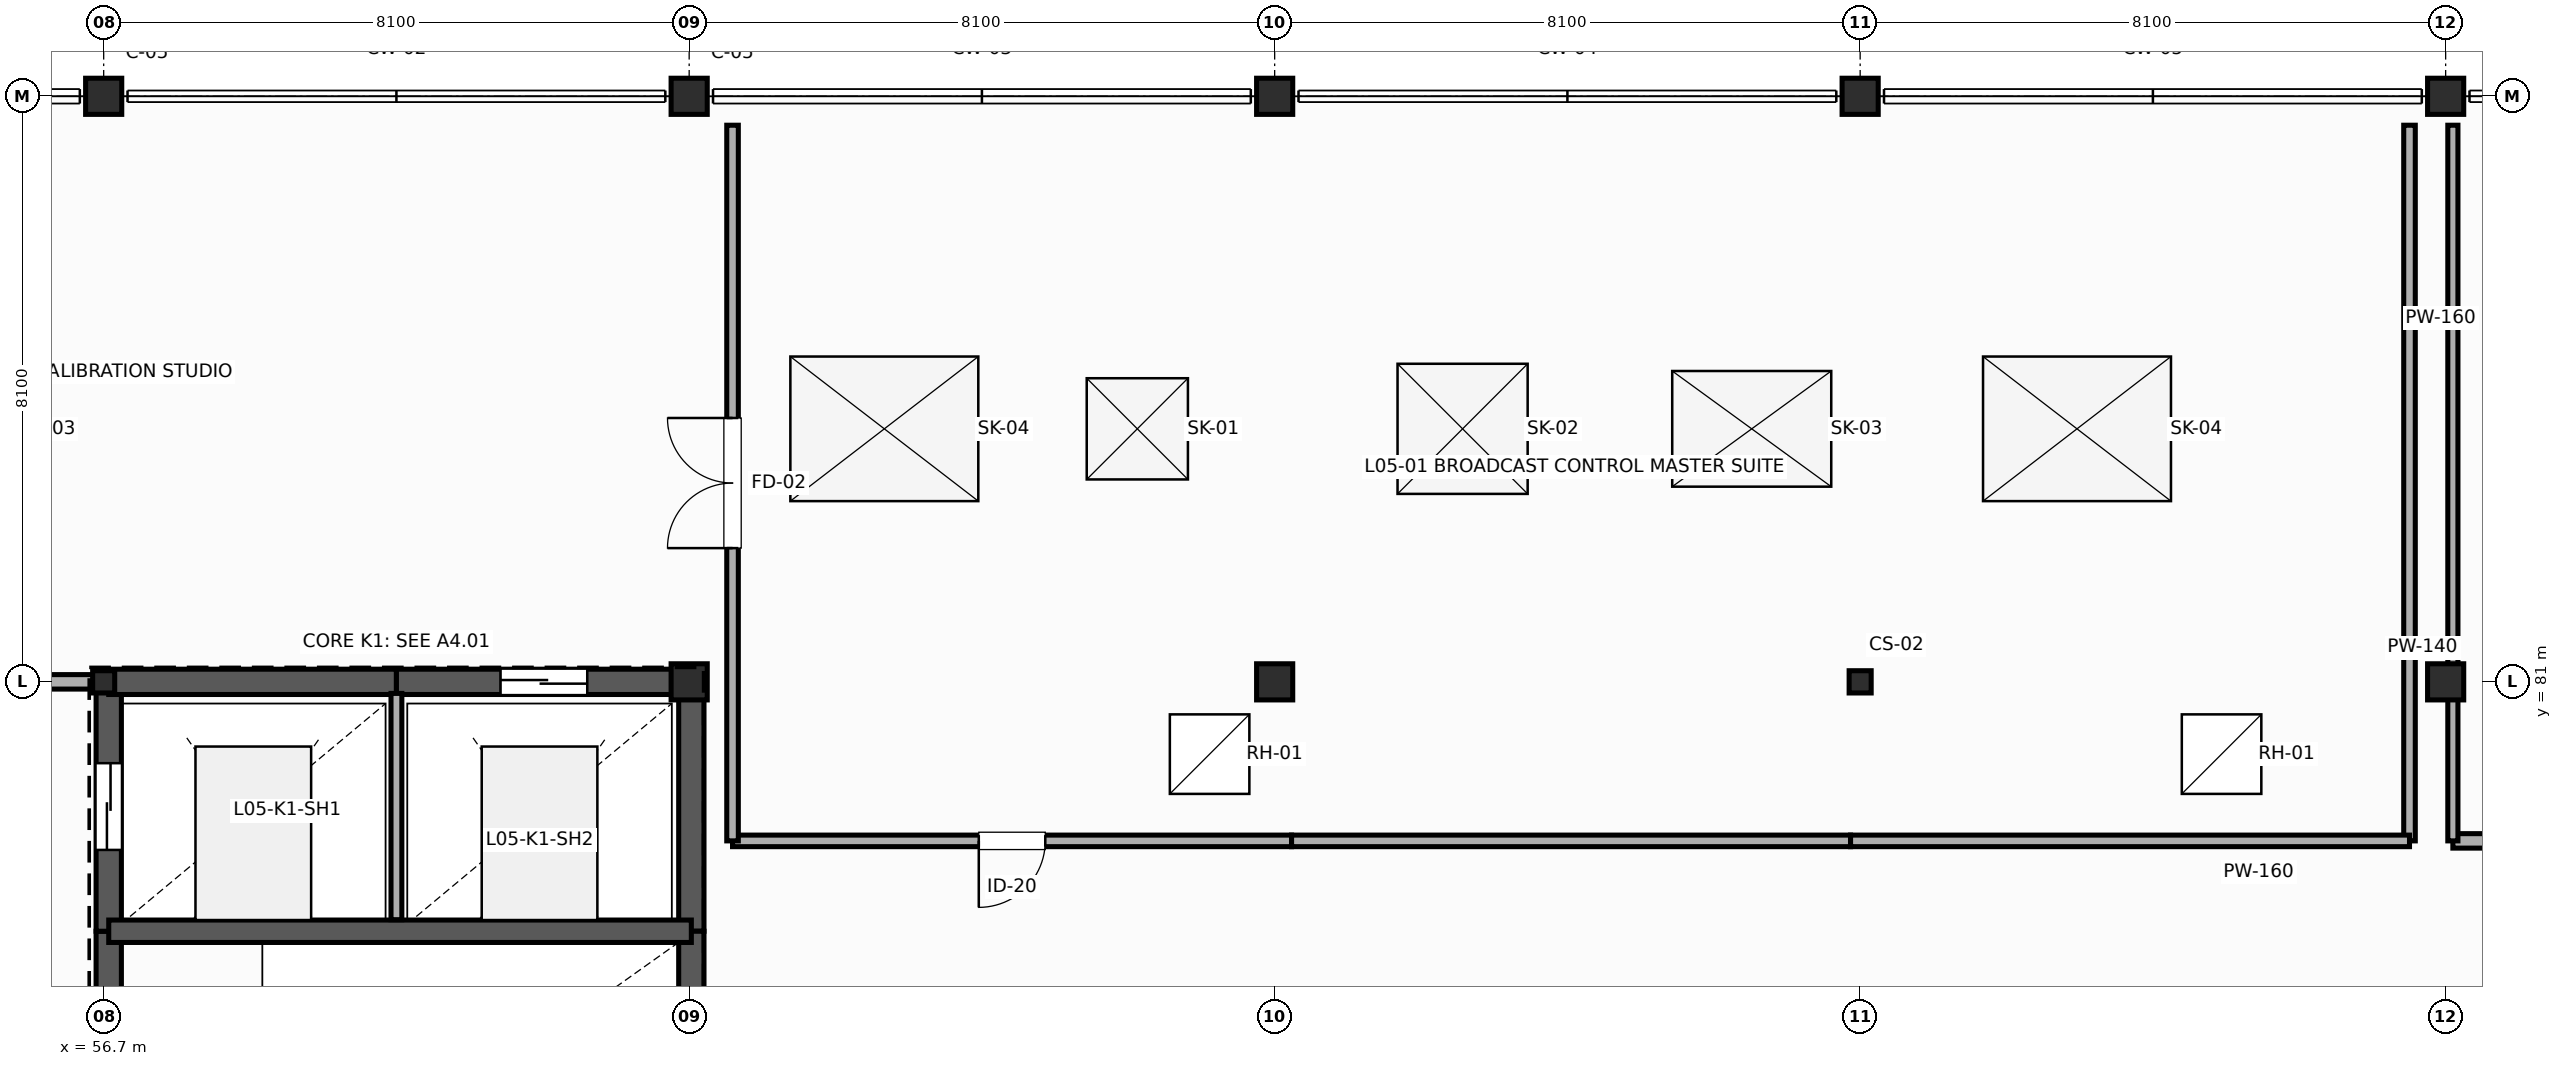
"""IFC4 building model, lengths in metres.
Left out: names, types, materials, properties, quantities, classifications, styles, units other than length and angle.
Written with IfcOpenShell. Run it as: python <this file> out.ifc"""

import sys

from ifc_helpers import new_model, si_unit, direction, frame, frame_2d, origin, origin_2d, place, context, subcontext, project, spatial, rectangle, i_section, extrude, element, fill, save


model = new_model("IFC4")
c1 = context("Model", 3, precision=1e-05, world=origin(), true_north=direction((0.0, 1.0)))
c2 = subcontext(c1, "Body", "Model", "MODEL_VIEW")
j1 = project(units=[si_unit("LENGTHUNIT", "METRE"), si_unit("PLANEANGLEUNIT", "RADIAN")], contexts=[c1])
p1 = place(None, origin())
s1 = spatial("IfcSite", under=j1, at=p1, CompositionType="ELEMENT")
p2 = place(p1, origin())
s2 = spatial("IfcBuilding", under=s1, at=p2, CompositionType="ELEMENT")
p3 = place(p2, frame((0.0, 0.0, 23.4)))
s3 = spatial("IfcBuildingStorey", under=s2, at=p3, CompositionType="ELEMENT", Elevation=23.4)
p4 = place(p3, frame((56.7, 81.0, 0.0), z_axis=(0.0, 0.0, 1.0), x_axis=(1.0, 0.0, 0.0)))
e1 = element("IfcColumn", 1, at=p4, inside=s3, PredefinedType="COLUMN", context=c2, shape_type="SweptSolid", body=[
    extrude(i_section(OverallWidth=0.305, OverallDepth=0.308, WebThickness=0.01, FlangeThickness=0.015, FilletRadius=0.015, at=origin_2d()), origin(), (0.0, 0.0, 1.0), 4.2),
])
for number, where, z_axis, x_axis in (
    (2, (56.7, 89.1, 0.0), (0.0, 0.0, 1.0), (1.0, 0.0, 0.0)),
    (3, (64.8, 81.0, 0.0), (0.0, 0.0, 1.0), (1.0, 0.0, 0.0)),
    (4, (64.8, 89.1, 0.0), (0.0, 0.0, 1.0), (1.0, 0.0, 0.0)),
    (5, (72.9, 81.0, 0.0), (0.0, 0.0, 1.0), (1.0, 0.0, 0.0)),
    (6, (72.9, 89.1, 0.0), (0.0, 0.0, 1.0), (1.0, 0.0, 0.0)),
):
    element("IfcColumn", number, at=place(p3, frame(where, z_axis=z_axis, x_axis=x_axis)), inside=s3, PredefinedType="COLUMN", context=c2, shape_type="SweptSolid", body=[
        extrude(rectangle(XDim=0.5, YDim=0.5, at=origin_2d()), origin(), (0.0, 0.0, 1.0), 4.2),
    ])
p5 = place(p3, frame((81.0, 81.0, 0.0), z_axis=(0.0, 0.0, 1.0), x_axis=(1.0, 0.0, 0.0)))
e7 = element("IfcColumn", 7, at=p5, inside=s3, PredefinedType="COLUMN", context=c2, shape_type="SweptSolid", body=[
    extrude(i_section(OverallWidth=0.305, OverallDepth=0.308, WebThickness=0.01, FlangeThickness=0.015, FilletRadius=0.015, at=origin_2d()), origin(), (0.0, 0.0, 1.0), 4.2),
])
for number, where, z_axis, x_axis in (
    (8, (81.0, 89.1, 0.0), (0.0, 0.0, 1.0), (1.0, 0.0, 0.0)),
    (9, (89.1, 81.0, 0.0), (0.0, 0.0, 1.0), (1.0, 0.0, 0.0)),
    (10, (89.1, 89.1, 0.0), (0.0, 0.0, 1.0), (1.0, 0.0, 0.0)),
):
    element("IfcColumn", number, at=place(p3, frame(where, z_axis=z_axis, x_axis=x_axis)), inside=s3, PredefinedType="COLUMN", context=c2, shape_type="SweptSolid", body=[
        extrude(rectangle(XDim=0.5, YDim=0.5, at=origin_2d()), origin(), (0.0, 0.0, 1.0), 4.2),
    ])
p6 = place(p3, frame((56.77, 73.13, 0.0), z_axis=(0.0, 0.0, 1.0), x_axis=(0.0, 1.0, 0.0)))
e11 = element("IfcWall", 11, at=p6, inside=s3, PredefinedType="SHEAR", context=c2, shape_type="SweptSolid", body=[
    extrude(rectangle(XDim=4.42, YDim=0.35, at=frame_2d((2.21, 0.0))), origin(), (0.0, 0.0, 1.0), 4.2),
])
p7 = place(p6, frame((1.35, 0.0, 0.0)))
e12 = element("IfcOpeningElement", 12, at=p7, cuts=e11, PredefinedType="OPENING", context=c2, shape_type="SweptSolid", body=[
    extrude(rectangle(XDim=1.2, YDim=2.25, at=frame_2d((0.6, 1.125))), frame((0.0, 0.185, 0.0), z_axis=(0.0, -1.0, 0.0), x_axis=(1.0, 0.0, 0.0)), (0.0, 0.0, 1.0), 0.37),
])
p8 = place(p3, frame((56.77, 77.55, 0.0), z_axis=(0.0, 0.0, 1.0), x_axis=(0.0, 1.0, 0.0)))
e13 = element("IfcWall", 13, at=p8, inside=s3, PredefinedType="SHEAR", context=c2, shape_type="SweptSolid", body=[
    extrude(rectangle(XDim=3.45, YDim=0.35, at=frame_2d((1.725, 0.0))), origin(), (0.0, 0.0, 1.0), 4.2),
])
p9 = place(p8, frame((1.125, 0.0, 0.0)))
e14 = element("IfcOpeningElement", 14, at=p9, cuts=e13, PredefinedType="OPENING", context=c2, shape_type="SweptSolid", body=[
    extrude(rectangle(XDim=1.2, YDim=2.2, at=frame_2d((0.6, 1.1))), frame((0.0, 0.185, 0.0), z_axis=(0.0, -1.0, 0.0), x_axis=(1.0, 0.0, 0.0)), (0.0, 0.0, 1.0), 0.37),
])
p10 = place(p3, frame((56.77, 81.0, 0.0), z_axis=(0.0, 0.0, 1.0), x_axis=(1.0, 0.0, 0.0)))
e15 = element("IfcWall", 15, at=p10, inside=s3, PredefinedType="SHEAR", context=c2, shape_type="SweptSolid", body=[
    extrude(rectangle(XDim=3.98, YDim=0.35, at=frame_2d((1.99, 0.0))), origin(), (0.0, 0.0, 1.0), 4.2),
])
p11 = place(p3, frame((60.75, 81.0, 0.0), z_axis=(0.0, 0.0, 1.0), x_axis=(1.0, 0.0, 0.0)))
e16 = element("IfcWall", 16, at=p11, inside=s3, PredefinedType="SHEAR", context=c2, shape_type="SweptSolid", body=[
    extrude(rectangle(XDim=4.08, YDim=0.35, at=frame_2d((2.04, 0.0))), origin(), (0.0, 0.0, 1.0), 4.2),
])
p12 = place(p11, frame((1.44, 0.0, 0.0)))
e17 = element("IfcOpeningElement", 17, at=p12, cuts=e16, PredefinedType="OPENING", context=c2, shape_type="SweptSolid", body=[
    extrude(rectangle(XDim=1.2, YDim=2.2, at=frame_2d((0.6, 1.1))), frame((0.0, 0.185, 0.0), z_axis=(0.0, -1.0, 0.0), x_axis=(1.0, 0.0, 0.0)), (0.0, 0.0, 1.0), 0.37),
])
p13 = place(p3, frame((64.83, 81.0, 0.0), z_axis=(0.0, 0.0, 1.0), x_axis=(0.0, -1.0, 0.0)))
e18 = element("IfcWall", 18, at=p13, inside=s3, PredefinedType="SHEAR", context=c2, shape_type="SweptSolid", body=[
    extrude(rectangle(XDim=3.45, YDim=0.35, at=frame_2d((1.725, 0.0))), origin(), (0.0, 0.0, 1.0), 4.2),
])
p14 = place(p3, frame((64.83, 77.55, 0.0), z_axis=(0.0, 0.0, 1.0), x_axis=(0.0, -1.0, 0.0)))
e19 = element("IfcWall", 19, at=p14, inside=s3, PredefinedType="SHEAR", context=c2, shape_type="SweptSolid", body=[
    extrude(rectangle(XDim=4.42, YDim=0.35, at=frame_2d((2.21, 0.0))), origin(), (0.0, 0.0, 1.0), 4.2),
])
p15 = place(p3, frame((56.77, 77.55, 0.0), z_axis=(0.0, 0.0, 1.0), x_axis=(1.0, 0.0, 0.0)))
e20 = element("IfcWall", 20, at=p15, inside=s3, PredefinedType="SHEAR", context=c2, shape_type="SweptSolid", body=[
    extrude(rectangle(XDim=8.06, YDim=0.31, at=frame_2d((4.03, 0.0))), origin(), (0.0, 0.0, 1.0), 4.2),
])
p16 = place(p3, frame((60.75, 77.71, 0.0), z_axis=(0.0, 0.0, 1.0), x_axis=(0.0, 1.0, 0.0)))
e21 = element("IfcWall", 21, at=p16, inside=s3, PredefinedType="PLUMBINGWALL", context=c2, shape_type="SweptSolid", body=[
    extrude(rectangle(XDim=3.13, YDim=0.15, at=frame_2d((1.565, 0.0))), origin(), (0.0, 0.0, 1.0), 3.85),
])
p17 = place(p3, frame((51.3, 81.0, 0.0), z_axis=(0.0, 0.0, 1.0), x_axis=(1.0, 0.0, 0.0)))
e22 = element("IfcWall", 22, at=p17, inside=s3, PredefinedType="PARTITIONING", context=c2, shape_type="SweptSolid", body=[
    extrude(rectangle(XDim=5.47, YDim=0.2, at=frame_2d((2.735, 0.0))), origin(), (0.0, 0.0, 1.0), 3.431),
])
p18 = place(p3, frame((88.6, 88.7, 0.0), z_axis=(0.0, 0.0, 1.0), x_axis=(0.0, -1.0, 0.0)))
e23 = element("IfcWall", 23, at=p18, inside=s3, PredefinedType="PARTITIONING", context=c2, shape_type="SweptSolid", body=[
    extrude(rectangle(XDim=9.9, YDim=0.16, at=frame_2d((4.95, 0.0))), origin(), (0.0, 0.0, 1.0), 3.92),
])
for number, where, z_axis, x_axis in (
    (24, (88.6, 78.8, 0.0), (0.0, 0.0, 1.0), (-1.0, 0.0, 0.0)),
    (25, (80.867, 78.8, 0.0), (0.0, 0.0, 1.0), (-1.0, 0.0, 0.0)),
):
    element("IfcWall", number, at=place(p3, frame(where, z_axis=z_axis, x_axis=x_axis)), inside=s3, PredefinedType="PARTITIONING", context=c2, shape_type="SweptSolid", body=[
        extrude(rectangle(XDim=7.733, YDim=0.16, at=frame_2d((3.867, 0.0))), origin(), (0.0, 0.0, 1.0), 3.92),
    ])
p19 = place(p3, frame((73.133, 78.8, 0.0), z_axis=(0.0, 0.0, 1.0), x_axis=(-1.0, 0.0, 0.0)))
e26 = element("IfcWall", 26, at=p19, inside=s3, PredefinedType="PARTITIONING", context=c2, shape_type="SweptSolid", body=[
    extrude(rectangle(XDim=7.733, YDim=0.16, at=frame_2d((3.867, 0.0))), origin(), (0.0, 0.0, 1.0), 3.92),
])
p20 = place(p19, frame((3.406, 0.0, 0.0)))
e27 = element("IfcOpeningElement", 27, at=p20, cuts=e26, PredefinedType="OPENING", context=c2, shape_type="SweptSolid", body=[
    extrude(rectangle(XDim=0.92, YDim=2.1, at=frame_2d((0.46, 1.05))), frame((0.0, 0.09, 0.0), z_axis=(0.0, -1.0, 0.0), x_axis=(1.0, 0.0, 0.0)), (0.0, 0.0, 1.0), 0.18),
])
p21 = place(p3, frame((65.4, 78.8, 0.0), z_axis=(0.0, 0.0, 1.0), x_axis=(0.0, 1.0, 0.0)))
e28 = element("IfcWall", 28, at=p21, inside=s3, PredefinedType="PARTITIONING", context=c2, shape_type="SweptSolid", body=[
    extrude(rectangle(XDim=9.9, YDim=0.16, at=frame_2d((4.95, 0.0))), origin(), (0.0, 0.0, 1.0), 3.92),
])
p22 = place(p21, frame((4.05, 0.0, 0.0)))
e29 = element("IfcOpeningElement", 29, at=p22, cuts=e28, PredefinedType="OPENING", context=c2, shape_type="SweptSolid", body=[
    extrude(rectangle(XDim=1.8, YDim=2.25, at=frame_2d((0.9, 1.125))), frame((0.0, 0.09, 0.0), z_axis=(0.0, -1.0, 0.0), x_axis=(1.0, 0.0, 0.0)), (0.0, 0.0, 1.0), 0.18),
])
p23 = place(p3, frame((97.133, 78.8, 0.0), z_axis=(0.0, 0.0, 1.0), x_axis=(-1.0, 0.0, 0.0)))
e30 = element("IfcWall", 30, at=p23, inside=s3, PredefinedType="PARTITIONING", context=c2, shape_type="SweptSolid", body=[
    extrude(rectangle(XDim=7.933, YDim=0.2, at=frame_2d((3.967, 0.0))), origin(), (0.0, 0.0, 1.0), 3.92),
])
p24 = place(p3, frame((89.2, 78.8, 0.0), z_axis=(0.0, 0.0, 1.0), x_axis=(0.0, 1.0, 0.0)))
e31 = element("IfcWall", 31, at=p24, inside=s3, PredefinedType="PARTITIONING", context=c2, shape_type="SweptSolid", body=[
    extrude(rectangle(XDim=9.9, YDim=0.14, at=frame_2d((4.95, 0.0))), origin(), (0.0, 0.0, 1.0), 3.495),
])
p25 = place(p2, frame((0.0, 0.0, 27.6)))
p26 = place(p25, frame((0.0, 0.0, -0.23)))
p27 = place(p26, frame((67.5, 84.5, 0.0)))
p28 = place(p27, frame((0.0, 0.0, 0.18)))
e32 = element("IfcWindow", 32, at=p28, inside=s3, PartitioningType="SINGLE_PANEL", PredefinedType="SKYLIGHT", context=c2, shape_type="SweptSolid", body=[
    extrude(rectangle(XDim=2.6, YDim=2.0, at=origin_2d()), origin(), (0.0, 0.0, 1.0), 0.05),
])
p29 = place(p26, frame((71.0, 84.5, 0.0)))
p30 = place(p29, frame((0.0, 0.0, 0.18)))
e33 = element("IfcWindow", 33, at=p30, inside=s3, PartitioningType="SINGLE_PANEL", PredefinedType="SKYLIGHT", context=c2, shape_type="SweptSolid", body=[
    extrude(rectangle(XDim=1.4, YDim=1.4, at=origin_2d()), origin(), (0.0, 0.0, 1.0), 0.05),
])
p31 = place(p26, frame((75.5, 84.5, 0.0)))
p32 = place(p31, frame((0.0, 0.0, 0.18)))
e34 = element("IfcWindow", 34, at=p32, inside=s3, PartitioningType="SINGLE_PANEL", PredefinedType="SKYLIGHT", context=c2, shape_type="SweptSolid", body=[
    extrude(rectangle(XDim=1.8, YDim=1.8, at=origin_2d()), origin(), (0.0, 0.0, 1.0), 0.05),
])
p33 = place(p26, frame((79.5, 84.5, 0.0)))
p34 = place(p33, frame((0.0, 0.0, 0.18)))
e35 = element("IfcWindow", 35, at=p34, inside=s3, PartitioningType="SINGLE_PANEL", PredefinedType="SKYLIGHT", context=c2, shape_type="SweptSolid", body=[
    extrude(rectangle(XDim=2.2, YDim=1.6, at=origin_2d()), origin(), (0.0, 0.0, 1.0), 0.05),
])
p35 = place(p26, frame((84.0, 84.5, 0.0)))
p36 = place(p35, frame((0.0, 0.0, 0.18)))
e36 = element("IfcWindow", 36, at=p36, inside=s3, PartitioningType="SINGLE_PANEL", PredefinedType="SKYLIGHT", context=c2, shape_type="SweptSolid", body=[
    extrude(rectangle(XDim=2.6, YDim=2.0, at=origin_2d()), origin(), (0.0, 0.0, 1.0), 0.05),
])
p37 = place(p26, frame((72.0, 80.0, 0.0)))
p38 = place(p37, frame((0.0, 0.0, 0.18)))
e37 = element("IfcDoor", 37, at=p38, inside=s3, OperationType="SINGLE_SWING_LEFT", PredefinedType="TRAPDOOR", context=c2, shape_type="SweptSolid", body=[
    extrude(rectangle(XDim=1.1, YDim=1.1, at=origin_2d()), origin(), (0.0, 0.0, 1.0), 0.05),
])
p39 = place(p26, frame((86.0, 80.0, 0.0)))
p40 = place(p39, frame((0.0, 0.0, 0.18)))
e38 = element("IfcDoor", 38, at=p40, inside=s3, OperationType="SINGLE_SWING_LEFT", PredefinedType="TRAPDOOR", context=c2, shape_type="SweptSolid", body=[
    extrude(rectangle(XDim=1.1, YDim=1.1, at=origin_2d()), origin(), (0.0, 0.0, 1.0), 0.05),
])
p41 = place(p9, origin())
e39 = element("IfcDoor", 39, at=p41, inside=s3, OperationType="SLIDING_TO_LEFT", PredefinedType="DOOR", context=c2, shape_type="SweptSolid", body=[
    extrude(rectangle(XDim=1.2, YDim=2.2, at=frame_2d((0.6, 1.1))), frame((0.0, 0.025, 0.0), z_axis=(0.0, -1.0, 0.0), x_axis=(1.0, 0.0, 0.0)), (0.0, 0.0, 1.0), 0.05),
])
fill(e14, e39)
p42 = place(p12, origin())
e40 = element("IfcDoor", 40, at=p42, inside=s3, OperationType="SLIDING_TO_LEFT", PredefinedType="DOOR", context=c2, shape_type="SweptSolid", body=[
    extrude(rectangle(XDim=1.2, YDim=2.2, at=frame_2d((0.6, 1.1))), frame((0.0, 0.025, 0.0), z_axis=(0.0, -1.0, 0.0), x_axis=(1.0, 0.0, 0.0)), (0.0, 0.0, 1.0), 0.05),
])
fill(e17, e40)
p43 = place(p22, origin())
e41 = element("IfcDoor", 41, at=p43, inside=s3, OperationType="DOUBLE_DOOR_SINGLE_SWING", PredefinedType="DOOR", context=c2, shape_type="SweptSolid", body=[
    extrude(rectangle(XDim=1.8, YDim=2.25, at=frame_2d((0.9, 1.125))), frame((0.0, 0.025, 0.0), z_axis=(0.0, -1.0, 0.0), x_axis=(1.0, 0.0, 0.0)), (0.0, 0.0, 1.0), 0.05),
])
fill(e29, e41)
p44 = place(p20, origin())
e42 = element("IfcDoor", 42, at=p44, inside=s3, OperationType="SINGLE_SWING_RIGHT", PredefinedType="DOOR", context=c2, shape_type="SweptSolid", body=[
    extrude(rectangle(XDim=0.92, YDim=2.1, at=frame_2d((0.46, 1.05))), frame((0.0, 0.025, 0.0), z_axis=(0.0, -1.0, 0.0), x_axis=(1.0, 0.0, 0.0)), (0.0, 0.0, 1.0), 0.05),
])
fill(e27, e42)
save(model, sys.argv[1])
